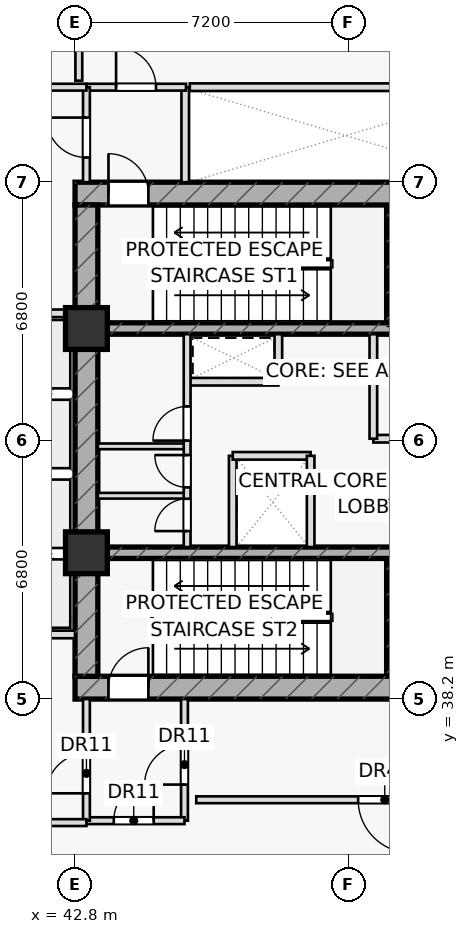
"""IFC4 building model, lengths in metres.
Left out: names, types, materials, properties, quantities, classifications, styles, units other than length and angle.
Written with IfcOpenShell. Run it as: python <this file> out.ifc"""

import sys

from ifc_helpers import new_model, si_unit, direction, frame, frame_2d, origin, origin_2d, place, context, subcontext, project, spatial, rectangle, extrude, element, fill, save


model = new_model("IFC4")
c1 = context("Model", 3, precision=1e-05, world=origin(), true_north=direction((0.0, 1.0)))
c2 = subcontext(c1, "Body", "Model", "MODEL_VIEW")
j1 = project(units=[si_unit("LENGTHUNIT", "METRE"), si_unit("PLANEANGLEUNIT", "RADIAN")], contexts=[c1])
p1 = place(None, origin())
s1 = spatial("IfcSite", under=j1, at=p1, CompositionType="ELEMENT")
p2 = place(p1, origin())
s2 = spatial("IfcBuilding", under=s1, at=p2, CompositionType="ELEMENT")
p3 = place(p2, frame((0.0, 0.0, 97.8)))
s3 = spatial("IfcBuildingStorey", under=s2, at=p3, CompositionType="ELEMENT", Elevation=97.8)
for number, where, z_axis, x_axis in (
    (1, (51.11, 48.1, 0.0), (0.0, 0.0, 1.0), (0.0, 1.0, 0.0)),
    (2, (51.11, 38.8, 0.0), (0.0, 0.0, 1.0), (0.0, 1.0, 0.0)),
):
    element("IfcWall", number, at=place(p3, frame(where, z_axis=z_axis, x_axis=x_axis)), inside=s3, PredefinedType="SHEAR", context=c2, shape_type="SweptSolid", body=[
        extrude(rectangle(XDim=3.1, YDim=0.22, at=frame_2d((1.55, 0.0))), origin(), (0.0, 0.0, 1.0), 4.55),
    ])
p4 = place(p3, frame((42.8, 51.5, 0.0), z_axis=(0.0, 0.0, 1.0), x_axis=(1.0, 0.0, 0.0)))
e3 = element("IfcWall", 3, at=p4, inside=s3, PredefinedType="SHEAR", context=c2, shape_type="SweptSolid", body=[
    extrude(rectangle(XDim=14.4, YDim=0.6, at=frame_2d((7.2, 0.0))), origin(), (0.0, 0.0, 1.0), 4.55),
])
p5 = place(p4, frame((0.88, 0.0, 0.0)))
e4 = element("IfcOpeningElement", 4, at=p5, cuts=e3, PredefinedType="OPENING", context=c2, shape_type="SweptSolid", body=[
    extrude(rectangle(XDim=1.05, YDim=2.2, at=frame_2d((0.525, 1.1))), frame((0.0, 0.31, 0.0), z_axis=(0.0, -1.0, 0.0), x_axis=(1.0, 0.0, 0.0)), (0.0, 0.0, 1.0), 0.62),
])
p6 = place(p3, frame((42.8, 38.5, 0.0), z_axis=(0.0, 0.0, 1.0), x_axis=(1.0, 0.0, 0.0)))
e5 = element("IfcWall", 5, at=p6, inside=s3, PredefinedType="SHEAR", context=c2, shape_type="SweptSolid", body=[
    extrude(rectangle(XDim=14.4, YDim=0.6, at=frame_2d((7.2, 0.0))), origin(), (0.0, 0.0, 1.0), 4.55),
])
p7 = place(p6, frame((0.88, 0.0, 0.0)))
e6 = element("IfcOpeningElement", 6, at=p7, cuts=e5, PredefinedType="OPENING", context=c2, shape_type="SweptSolid", body=[
    extrude(rectangle(XDim=1.05, YDim=2.2, at=frame_2d((0.525, 1.1))), frame((0.0, 0.31, 0.0), z_axis=(0.0, -1.0, 0.0), x_axis=(1.0, 0.0, 0.0)), (0.0, 0.0, 1.0), 0.62),
])
p8 = place(p3, frame((43.1, 38.8, 0.0), z_axis=(0.0, 0.0, 1.0), x_axis=(0.0, 1.0, 0.0)))
e7 = element("IfcWall", 7, at=p8, inside=s3, PredefinedType="SHEAR", context=c2, shape_type="SweptSolid", body=[
    extrude(rectangle(XDim=12.4, YDim=0.6, at=frame_2d((6.2, 0.0))), origin(), (0.0, 0.0, 1.0), 4.55),
])
p9 = place(p3, frame((43.4, 47.95, 0.0), z_axis=(0.0, 0.0, 1.0), x_axis=(1.0, 0.0, 0.0)))
e8 = element("IfcWall", 8, at=p9, inside=s3, PredefinedType="SHEAR", context=c2, shape_type="SweptSolid", body=[
    extrude(rectangle(XDim=13.2, YDim=0.3, at=frame_2d((6.6, 0.0))), origin(), (0.0, 0.0, 1.0), 4.55),
])
p10 = place(p9, frame((8.345, 0.0, 0.0)))
e9 = element("IfcOpeningElement", 9, at=p10, cuts=e8, PredefinedType="OPENING", context=c2, shape_type="SweptSolid", body=[
    extrude(rectangle(XDim=1.15, YDim=2.2, at=frame_2d((0.575, 1.1))), frame((0.0, 0.16, 0.0), z_axis=(0.0, -1.0, 0.0), x_axis=(1.0, 0.0, 0.0)), (0.0, 0.0, 1.0), 0.32),
])
p11 = place(p9, frame((10.065, 0.0, 0.0)))
e10 = element("IfcOpeningElement", 10, at=p11, cuts=e8, PredefinedType="OPENING", context=c2, shape_type="SweptSolid", body=[
    extrude(rectangle(XDim=1.15, YDim=2.2, at=frame_2d((0.575, 1.1))), frame((0.0, 0.16, 0.0), z_axis=(0.0, -1.0, 0.0), x_axis=(1.0, 0.0, 0.0)), (0.0, 0.0, 1.0), 0.32),
])
p12 = place(p9, frame((11.645, 0.0, 0.0)))
e11 = element("IfcOpeningElement", 11, at=p12, cuts=e8, PredefinedType="OPENING", context=c2, shape_type="SweptSolid", body=[
    extrude(rectangle(XDim=1.15, YDim=2.2, at=frame_2d((0.575, 1.1))), frame((0.0, 0.16, 0.0), z_axis=(0.0, -1.0, 0.0), x_axis=(1.0, 0.0, 0.0)), (0.0, 0.0, 1.0), 0.32),
])
p13 = place(p3, frame((43.4, 42.05, 0.0), z_axis=(0.0, 0.0, 1.0), x_axis=(1.0, 0.0, 0.0)))
e12 = element("IfcWall", 12, at=p13, inside=s3, PredefinedType="SHEAR", context=c2, shape_type="SweptSolid", body=[
    extrude(rectangle(XDim=13.2, YDim=0.3, at=frame_2d((6.6, 0.0))), origin(), (0.0, 0.0, 1.0), 4.55),
])
for number, where, z_axis, x_axis in (
    (13, (43.1, 47.95, 0.0), (0.0, 0.0, 1.0), (1.0, 0.0, 0.0)),
    (14, (43.1, 42.05, 0.0), (0.0, 0.0, 1.0), (1.0, 0.0, 0.0)),
):
    element("IfcColumn", number, at=place(p3, frame(where, z_axis=z_axis, x_axis=x_axis)), inside=s3, PredefinedType="COLUMN", context=c2, shape_type="SweptSolid", body=[
        extrude(rectangle(XDim=1.1, YDim=1.1, at=origin_2d()), origin(), (0.0, 0.0, 1.0), 4.55),
    ])
for number, where, z_axis, x_axis in (
    (15, (40.3, 39.9, 0.0), (0.0, 0.0, 1.0), (1.0, 0.0, 0.0)),
    (16, (40.3, 48.35, 0.0), (0.0, 0.0, 1.0), (1.0, 0.0, 0.0)),
    (17, (45.7, 51.8, 0.0), (0.0, 0.0, 1.0), (0.0, 1.0, 0.0)),
):
    element("IfcWall", number, at=place(p3, frame(where, z_axis=z_axis, x_axis=x_axis)), inside=s3, PredefinedType="PARTITIONING", context=c2, shape_type="SweptSolid", body=[
        extrude(rectangle(XDim=2.5, YDim=0.2, at=frame_2d((1.25, 0.0))), origin(), (0.0, 0.0, 1.0), 4.55),
    ])
p14 = place(p3, frame((45.75, 46.55, 0.0), z_axis=(0.0, 0.0, 1.0), x_axis=(1.0, 0.0, 0.0)))
e18 = element("IfcWall", 18, at=p14, inside=s3, PredefinedType="PARTITIONING", context=c2, shape_type="SweptSolid", body=[
    extrude(rectangle(XDim=2.4, YDim=0.2, at=frame_2d((1.2, 0.0))), origin(), (0.0, 0.0, 1.0), 4.55),
])
p15 = place(p3, frame((48.15, 46.55, 0.0), z_axis=(0.0, 0.0, 1.0), x_axis=(0.0, 1.0, 0.0)))
e19 = element("IfcWall", 19, at=p15, inside=s3, PredefinedType="PARTITIONING", context=c2, shape_type="SweptSolid", body=[
    extrude(rectangle(XDim=1.25, YDim=0.2, at=frame_2d((0.625, 0.0))), origin(), (0.0, 0.0, 1.0), 4.55),
])
p16 = place(p3, frame((46.95, 42.2, 0.0), z_axis=(0.0, 0.0, 1.0), x_axis=(0.0, 1.0, 0.0)))
e20 = element("IfcWall", 20, at=p16, inside=s3, PredefinedType="PARTITIONING", context=c2, shape_type="SweptSolid", body=[
    extrude(rectangle(XDim=2.4, YDim=0.2, at=frame_2d((1.2, 0.0))), origin(), (0.0, 0.0, 1.0), 4.55),
])
p17 = place(p3, frame((46.95, 44.6, 0.0), z_axis=(0.0, 0.0, 1.0), x_axis=(1.0, 0.0, 0.0)))
e21 = element("IfcWall", 21, at=p17, inside=s3, PredefinedType="PARTITIONING", context=c2, shape_type="SweptSolid", body=[
    extrude(rectangle(XDim=2.05, YDim=0.2, at=frame_2d((1.025, 0.0))), origin(), (0.0, 0.0, 1.0), 4.55),
])
p18 = place(p3, frame((50.65, 45.05, 0.0), z_axis=(0.0, 0.0, 1.0), x_axis=(1.0, 0.0, 0.0)))
e22 = element("IfcWall", 22, at=p18, inside=s3, PredefinedType="PARTITIONING", context=c2, shape_type="SweptSolid", body=[
    extrude(rectangle(XDim=5.95, YDim=0.2, at=frame_2d((2.975, 0.0))), origin(), (0.0, 0.0, 1.0), 4.55),
])
p19 = place(p18, frame((1.35, 0.0, 0.0)))
e23 = element("IfcOpeningElement", 23, at=p19, cuts=e22, PredefinedType="OPENING", context=c2, shape_type="SweptSolid", body=[
    extrude(rectangle(XDim=1.5, YDim=2.2, at=frame_2d((0.75, 1.1))), frame((0.0, 0.11, 0.0), z_axis=(0.0, -1.0, 0.0), x_axis=(1.0, 0.0, 0.0)), (0.0, 0.0, 1.0), 0.22),
])
p20 = place(p3, frame((50.65, 45.05, 0.0), z_axis=(0.0, 0.0, 1.0), x_axis=(0.0, 1.0, 0.0)))
e24 = element("IfcWall", 24, at=p20, inside=s3, PredefinedType="PARTITIONING", context=c2, shape_type="SweptSolid", body=[
    extrude(rectangle(XDim=2.75, YDim=0.2, at=frame_2d((1.375, 0.0))), origin(), (0.0, 0.0, 1.0), 4.55),
])
for number, where, z_axis, x_axis in (
    (25, (43.4, 43.55, 0.0), (0.0, 0.0, 1.0), (1.0, 0.0, 0.0)),
    (26, (43.4, 44.85, 0.0), (0.0, 0.0, 1.0), (1.0, 0.0, 0.0)),
):
    element("IfcWall", number, at=place(p3, frame(where, z_axis=z_axis, x_axis=x_axis)), inside=s3, PredefinedType="PARTITIONING", context=c2, shape_type="SweptSolid", body=[
        extrude(rectangle(XDim=2.35, YDim=0.15, at=frame_2d((1.175, 0.0))), origin(), (0.0, 0.0, 1.0), 4.55),
    ])
p21 = place(p3, frame((45.75, 42.2, 0.0), z_axis=(0.0, 0.0, 1.0), x_axis=(0.0, 1.0, 0.0)))
e27 = element("IfcWall", 27, at=p21, inside=s3, PredefinedType="PARTITIONING", context=c2, shape_type="SweptSolid", body=[
    extrude(rectangle(XDim=5.6, YDim=0.18, at=frame_2d((2.8, 0.0))), origin(), (0.0, 0.0, 1.0), 4.55),
])
p22 = place(p21, frame((0.42, 0.0, 0.0)))
e28 = element("IfcOpeningElement", 28, at=p22, cuts=e27, PredefinedType="OPENING", context=c2, shape_type="SweptSolid", body=[
    extrude(rectangle(XDim=0.85, YDim=2.05, at=frame_2d((0.425, 1.025))), frame((0.0, 0.1, 0.0), z_axis=(0.0, -1.0, 0.0), x_axis=(1.0, 0.0, 0.0)), (0.0, 0.0, 1.0), 0.2),
])
p23 = place(p21, frame((1.57, 0.0, 0.0)))
e29 = element("IfcOpeningElement", 29, at=p23, cuts=e27, PredefinedType="OPENING", context=c2, shape_type="SweptSolid", body=[
    extrude(rectangle(XDim=0.85, YDim=2.05, at=frame_2d((0.425, 1.025))), frame((0.0, 0.1, 0.0), z_axis=(0.0, -1.0, 0.0), x_axis=(1.0, 0.0, 0.0)), (0.0, 0.0, 1.0), 0.2),
])
p24 = place(p21, frame((2.8, 0.0, 0.0)))
e30 = element("IfcOpeningElement", 30, at=p24, cuts=e27, PredefinedType="OPENING", context=c2, shape_type="SweptSolid", body=[
    extrude(rectangle(XDim=0.9, YDim=2.05, at=frame_2d((0.45, 1.025))), frame((0.0, 0.1, 0.0), z_axis=(0.0, -1.0, 0.0), x_axis=(1.0, 0.0, 0.0)), (0.0, 0.0, 1.0), 0.2),
])
p25 = place(p3, frame((43.1, 54.3, 0.0), z_axis=(0.0, 0.0, 1.0), x_axis=(1.0, 0.0, 0.0)))
e31 = element("IfcWall", 31, at=p25, inside=s3, PredefinedType="PARTITIONING", context=c2, shape_type="SweptSolid", body=[
    extrude(rectangle(XDim=2.62, YDim=0.18, at=frame_2d((1.31, 0.0))), origin(), (0.0, 0.0, 1.0), 4.55),
])
p26 = place(p25, frame((0.78, 0.0, 0.0)))
e32 = element("IfcOpeningElement", 32, at=p26, cuts=e31, PredefinedType="OPENING", context=c2, shape_type="SweptSolid", body=[
    extrude(rectangle(XDim=1.05, YDim=2.2, at=frame_2d((0.525, 1.1))), frame((0.0, 0.1, 0.0), z_axis=(0.0, -1.0, 0.0), x_axis=(1.0, 0.0, 0.0)), (0.0, 0.0, 1.0), 0.2),
])
p27 = place(p3, frame((45.68, 35.0, 0.0), z_axis=(0.0, 0.0, 1.0), x_axis=(0.0, 1.0, 0.0)))
e33 = element("IfcWall", 33, at=p27, inside=s3, PredefinedType="PARTITIONING", context=c2, shape_type="SweptSolid", body=[
    extrude(rectangle(XDim=3.2, YDim=0.18, at=frame_2d((1.6, 0.0))), origin(), (0.0, 0.0, 1.0), 4.55),
])
p28 = place(p27, frame((0.95, 0.0, 0.0)))
e34 = element("IfcOpeningElement", 34, at=p28, cuts=e33, PredefinedType="OPENING", context=c2, shape_type="SweptSolid", body=[
    extrude(rectangle(XDim=1.05, YDim=2.2, at=frame_2d((0.525, 1.1))), frame((0.0, 0.1, 0.0), z_axis=(0.0, -1.0, 0.0), x_axis=(1.0, 0.0, 0.0)), (0.0, 0.0, 1.0), 0.2),
])
p29 = place(p3, frame((43.1, 35.0, 0.0), z_axis=(0.0, 0.0, 1.0), x_axis=(1.0, 0.0, 0.0)))
e35 = element("IfcWall", 35, at=p29, inside=s3, PredefinedType="PARTITIONING", context=c2, shape_type="SweptSolid", body=[
    extrude(rectangle(XDim=2.58, YDim=0.18, at=frame_2d((1.29, 0.0))), origin(), (0.0, 0.0, 1.0), 3.925),
])
p30 = place(p29, frame((0.72, 0.0, 0.0)))
e36 = element("IfcOpeningElement", 36, at=p30, cuts=e35, PredefinedType="OPENING", context=c2, shape_type="SweptSolid", body=[
    extrude(rectangle(XDim=1.05, YDim=2.2, at=frame_2d((0.525, 1.1))), frame((0.0, 0.1, 0.0), z_axis=(0.0, -1.0, 0.0), x_axis=(1.0, 0.0, 0.0)), (0.0, 0.0, 1.0), 0.2),
])
p31 = place(p3, frame((43.1, 51.8, 0.0), z_axis=(0.0, 0.0, 1.0), x_axis=(0.0, 1.0, 0.0)))
e37 = element("IfcWall", 37, at=p31, inside=s3, PredefinedType="PARTITIONING", context=c2, shape_type="SweptSolid", body=[
    extrude(rectangle(XDim=2.5, YDim=0.18, at=frame_2d((1.25, 0.0))), origin(), (0.0, 0.0, 1.0), 3.925),
])
p32 = place(p31, frame((0.65, 0.0, 0.0)))
e38 = element("IfcOpeningElement", 38, at=p32, cuts=e37, PredefinedType="OPENING", context=c2, shape_type="SweptSolid", body=[
    extrude(rectangle(XDim=1.05, YDim=2.2, at=frame_2d((0.525, 1.1))), frame((0.0, 0.1, 0.0), z_axis=(0.0, -1.0, 0.0), x_axis=(1.0, 0.0, 0.0)), (0.0, 0.0, 1.0), 0.2),
])
p33 = place(p3, frame((43.1, 35.0, 0.0), z_axis=(0.0, 0.0, 1.0), x_axis=(0.0, 1.0, 0.0)))
e39 = element("IfcWall", 39, at=p33, inside=s3, PredefinedType="PARTITIONING", context=c2, shape_type="SweptSolid", body=[
    extrude(rectangle(XDim=3.2, YDim=0.18, at=frame_2d((1.6, 0.0))), origin(), (0.0, 0.0, 1.0), 3.925),
])
p34 = place(p33, frame((0.72, 0.0, 0.0)))
e40 = element("IfcOpeningElement", 40, at=p34, cuts=e39, PredefinedType="OPENING", context=c2, shape_type="SweptSolid", body=[
    extrude(rectangle(XDim=1.05, YDim=2.2, at=frame_2d((0.525, 1.1))), frame((0.0, 0.1, 0.0), z_axis=(0.0, -1.0, 0.0), x_axis=(1.0, 0.0, 0.0)), (0.0, 0.0, 1.0), 0.2),
])
p35 = place(p3, frame((25.173, 54.3, 0.0), z_axis=(0.0, 0.0, 1.0), x_axis=(1.0, 0.0, 0.0)))
e41 = element("IfcWall", 41, at=p35, inside=s3, PredefinedType="PARTITIONING", context=c2, shape_type="SweptSolid", body=[
    extrude(rectangle(XDim=17.927, YDim=0.18, at=frame_2d((8.964, 0.0))), origin(), (0.0, 0.0, 1.0), 3.925),
])
p36 = place(p3, frame((22.285, 34.95, 0.0), z_axis=(0.0, 0.0, 1.0), x_axis=(1.0, 0.0, 0.0)))
e42 = element("IfcWall", 42, at=p36, inside=s3, PredefinedType="PARTITIONING", context=c2, shape_type="SweptSolid", body=[
    extrude(rectangle(XDim=20.815, YDim=0.18, at=frame_2d((10.407, 0.0))), origin(), (0.0, 0.0, 1.0), 3.925),
])
p37 = place(p3, frame((55.91, 35.55, 0.0), z_axis=(0.0, 0.0, 1.0), x_axis=(-1.0, 0.0, 0.0)))
e43 = element("IfcWall", 43, at=p37, inside=s3, PredefinedType="PARTITIONING", context=c2, shape_type="SweptSolid", body=[
    extrude(rectangle(XDim=9.92, YDim=0.18, at=frame_2d((4.96, 0.0))), origin(), (0.0, 0.0, 1.0), 4.55),
])
p38 = place(p37, frame((4.26, 0.0, 0.0)))
e44 = element("IfcOpeningElement", 44, at=p38, cuts=e43, PredefinedType="OPENING", context=c2, shape_type="SweptSolid", body=[
    extrude(rectangle(XDim=1.4, YDim=2.15, at=frame_2d((0.7, 1.075))), frame((0.0, 0.1, 0.0), z_axis=(0.0, -1.0, 0.0), x_axis=(1.0, 0.0, 0.0)), (0.0, 0.0, 1.0), 0.2),
])
p39 = place(p3, frame((42.9, 54.47, 0.0), z_axis=(0.0, 0.0, 1.0), x_axis=(0.0, 1.0, 0.0)))
e45 = element("IfcWall", 45, at=p39, inside=s3, PredefinedType="PARTITIONING", context=c2, shape_type="SweptSolid", body=[
    extrude(rectangle(XDim=2.69, YDim=0.18, at=frame_2d((1.345, 0.0))), origin(), (0.0, 0.0, 1.0), 3.925),
])
p40 = place(p3, frame((49.0, 42.2, 0.0), z_axis=(0.0, 0.0, 1.0), x_axis=(0.0, 1.0, 0.0)))
e46 = element("IfcWall", 46, at=p40, inside=s3, PredefinedType="PARTITIONING", context=c2, shape_type="SweptSolid", body=[
    extrude(rectangle(XDim=2.4, YDim=0.2, at=frame_2d((1.2, 0.0))), origin(), (0.0, 0.0, 1.0), 4.55),
])
p41 = place(p3, frame((45.82, 54.3, 0.0), z_axis=(0.0, 0.0, 1.0), x_axis=(1.0, 0.0, 0.0)))
e47 = element("IfcWall", 47, at=p41, inside=s3, PredefinedType="PARTITIONING", context=c2, shape_type="SweptSolid", body=[
    extrude(rectangle(XDim=8.31, YDim=0.2, at=frame_2d((4.155, 0.0))), origin(), (0.0, 0.0, 1.0), 4.55),
])
p42 = place(p5, origin())
e48 = element("IfcDoor", 48, at=p42, inside=s3, OperationType="SINGLE_SWING_LEFT", PredefinedType="DOOR", context=c2, shape_type="SweptSolid", body=[
    extrude(rectangle(XDim=1.05, YDim=2.2, at=frame_2d((0.525, 1.1))), frame((0.0, 0.025, 0.0), z_axis=(0.0, -1.0, 0.0), x_axis=(1.0, 0.0, 0.0)), (0.0, 0.0, 1.0), 0.05),
])
fill(e4, e48)
p43 = place(p7, origin())
e49 = element("IfcDoor", 49, at=p43, inside=s3, OperationType="SINGLE_SWING_RIGHT", PredefinedType="DOOR", context=c2, shape_type="SweptSolid", body=[
    extrude(rectangle(XDim=1.05, YDim=2.2, at=frame_2d((0.525, 1.1))), frame((0.0, 0.025, 0.0), z_axis=(0.0, -1.0, 0.0), x_axis=(1.0, 0.0, 0.0)), (0.0, 0.0, 1.0), 0.05),
])
fill(e6, e49)
p44 = place(p22, origin())
e50 = element("IfcDoor", 50, at=p44, inside=s3, OperationType="SINGLE_SWING_LEFT", PredefinedType="DOOR", context=c2, shape_type="SweptSolid", body=[
    extrude(rectangle(XDim=0.85, YDim=2.05, at=frame_2d((0.425, 1.025))), frame((0.0, 0.025, 0.0), z_axis=(0.0, -1.0, 0.0), x_axis=(1.0, 0.0, 0.0)), (0.0, 0.0, 1.0), 0.05),
])
fill(e28, e50)
p45 = place(p23, origin())
e51 = element("IfcDoor", 51, at=p45, inside=s3, OperationType="SINGLE_SWING_RIGHT", PredefinedType="DOOR", context=c2, shape_type="SweptSolid", body=[
    extrude(rectangle(XDim=0.85, YDim=2.05, at=frame_2d((0.425, 1.025))), frame((0.0, 0.025, 0.0), z_axis=(0.0, -1.0, 0.0), x_axis=(1.0, 0.0, 0.0)), (0.0, 0.0, 1.0), 0.05),
])
fill(e29, e51)
p46 = place(p24, origin())
e52 = element("IfcDoor", 52, at=p46, inside=s3, OperationType="SINGLE_SWING_LEFT", PredefinedType="DOOR", context=c2, shape_type="SweptSolid", body=[
    extrude(rectangle(XDim=0.9, YDim=2.05, at=frame_2d((0.45, 1.025))), frame((0.0, 0.025, 0.0), z_axis=(0.0, -1.0, 0.0), x_axis=(1.0, 0.0, 0.0)), (0.0, 0.0, 1.0), 0.05),
])
fill(e30, e52)
p47 = place(p26, origin())
e53 = element("IfcDoor", 53, at=p47, inside=s3, OperationType="SINGLE_SWING_LEFT", PredefinedType="DOOR", context=c2, shape_type="SweptSolid", body=[
    extrude(rectangle(XDim=1.05, YDim=2.2, at=frame_2d((0.525, 1.1))), frame((0.0, 0.025, 0.0), z_axis=(0.0, -1.0, 0.0), x_axis=(1.0, 0.0, 0.0)), (0.0, 0.0, 1.0), 0.05),
])
fill(e32, e53)
p48 = place(p28, origin())
e54 = element("IfcDoor", 54, at=p48, inside=s3, OperationType="SINGLE_SWING_LEFT", PredefinedType="DOOR", context=c2, shape_type="SweptSolid", body=[
    extrude(rectangle(XDim=1.05, YDim=2.2, at=frame_2d((0.525, 1.1))), frame((0.0, 0.025, 0.0), z_axis=(0.0, -1.0, 0.0), x_axis=(1.0, 0.0, 0.0)), (0.0, 0.0, 1.0), 0.05),
])
fill(e34, e54)
p49 = place(p30, origin())
e55 = element("IfcDoor", 55, at=p49, inside=s3, OperationType="SINGLE_SWING_RIGHT", PredefinedType="DOOR", context=c2, shape_type="SweptSolid", body=[
    extrude(rectangle(XDim=1.05, YDim=2.2, at=frame_2d((0.525, 1.1))), frame((0.0, 0.025, 0.0), z_axis=(0.0, -1.0, 0.0), x_axis=(1.0, 0.0, 0.0)), (0.0, 0.0, 1.0), 0.05),
])
fill(e36, e55)
p50 = place(p32, origin())
e56 = element("IfcDoor", 56, at=p50, inside=s3, OperationType="SINGLE_SWING_RIGHT", PredefinedType="DOOR", context=c2, shape_type="SweptSolid", body=[
    extrude(rectangle(XDim=1.05, YDim=2.2, at=frame_2d((0.525, 1.1))), frame((0.0, 0.025, 0.0), z_axis=(0.0, -1.0, 0.0), x_axis=(1.0, 0.0, 0.0)), (0.0, 0.0, 1.0), 0.05),
])
fill(e38, e56)
p51 = place(p34, origin())
e57 = element("IfcDoor", 57, at=p51, inside=s3, OperationType="SINGLE_SWING_LEFT", PredefinedType="DOOR", context=c2, shape_type="SweptSolid", body=[
    extrude(rectangle(XDim=1.05, YDim=2.2, at=frame_2d((0.525, 1.1))), frame((0.0, 0.025, 0.0), z_axis=(0.0, -1.0, 0.0), x_axis=(1.0, 0.0, 0.0)), (0.0, 0.0, 1.0), 0.05),
])
fill(e40, e57)
p52 = place(p38, origin())
e58 = element("IfcDoor", 58, at=p52, inside=s3, OperationType="SINGLE_SWING_LEFT", PredefinedType="DOOR", context=c2, shape_type="SweptSolid", body=[
    extrude(rectangle(XDim=1.4, YDim=2.15, at=frame_2d((0.7, 1.075))), frame((0.0, 0.025, 0.0), z_axis=(0.0, -1.0, 0.0), x_axis=(1.0, 0.0, 0.0)), (0.0, 0.0, 1.0), 0.05),
])
fill(e44, e58)
save(model, sys.argv[1])
